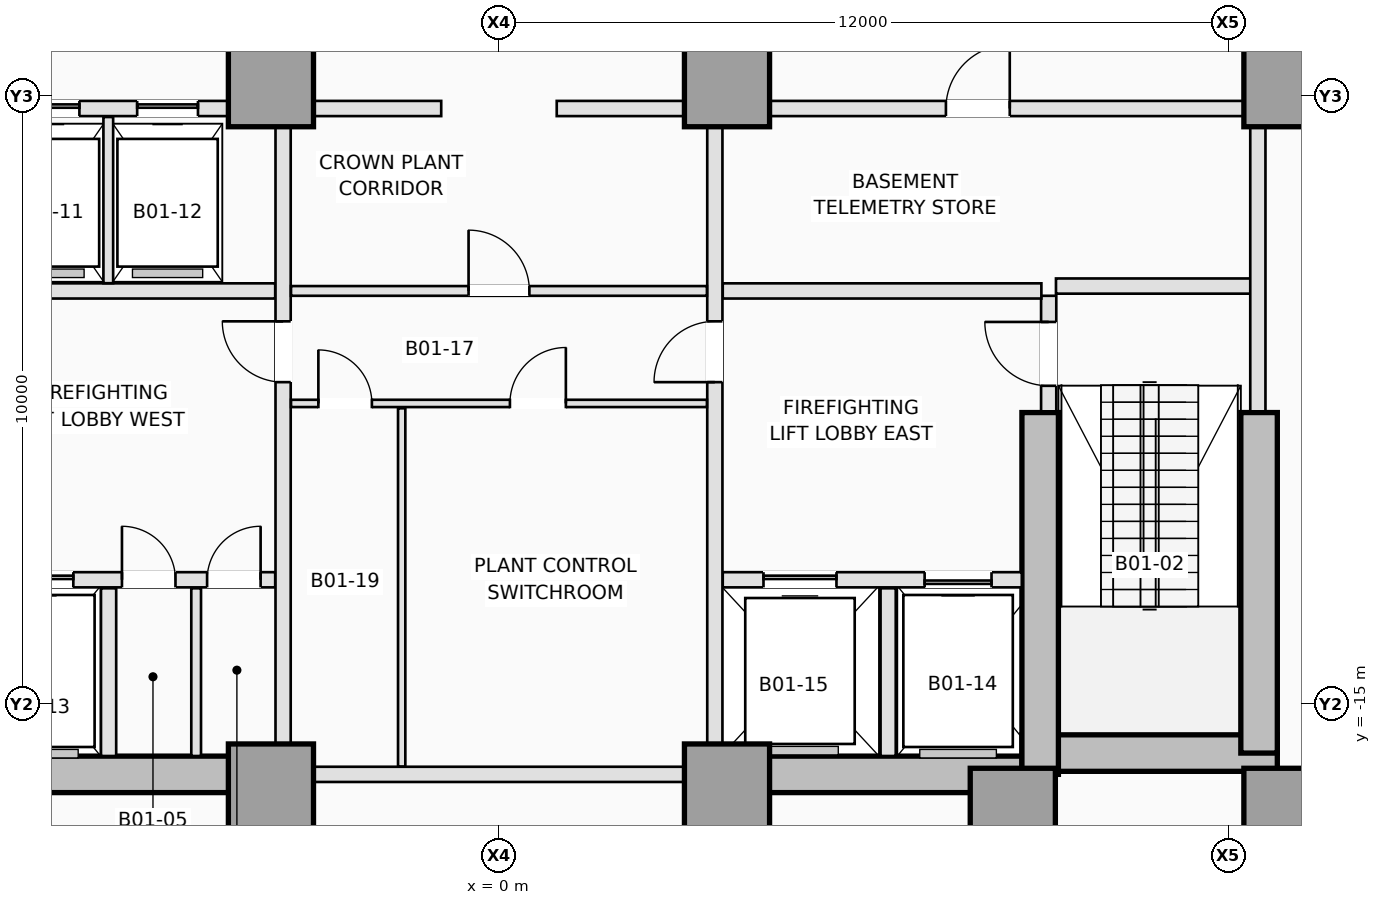
"""IFC4 building model, lengths in metres.
Left out: names, types, materials, properties, quantities, classifications, styles, units other than length and angle.
Written with IfcOpenShell. Run it as: python <this file> out.ifc"""

import sys

from ifc_helpers import new_model, si_unit, direction, frame, frame_2d, origin, origin_2d, place, context, subcontext, project, spatial, rectangle, extrude, element, fill, save


model = new_model("IFC4")
c1 = context("Model", 3, precision=1e-05, world=origin(), true_north=direction((0.0, 1.0)))
c2 = subcontext(c1, "Body", "Model", "MODEL_VIEW")
j1 = project(units=[si_unit("LENGTHUNIT", "METRE"), si_unit("PLANEANGLEUNIT", "RADIAN")], contexts=[c1])
p1 = place(None, origin())
s1 = spatial("IfcSite", under=j1, at=p1, CompositionType="ELEMENT")
p2 = place(p1, origin())
s2 = spatial("IfcBuilding", under=s1, at=p2, CompositionType="ELEMENT")
p3 = place(p2, frame((0.0, 0.0, -5.0)))
s3 = spatial("IfcBuildingStorey", under=s2, at=p3, CompositionType="ELEMENT", Elevation=-5.0)
for number, where, z_axis, x_axis in (
    (1, (-8.9, -16.15, 0.0), (0.0, 0.0, 1.0), (1.0, 0.0, 0.0)),
    (2, (3.75, -16.15, 0.0), (0.0, 0.0, 1.0), (1.0, 0.0, 0.0)),
):
    element("IfcWall", number, at=place(p3, frame(where, z_axis=z_axis, x_axis=x_axis)), inside=s3, PredefinedType="SHEAR", context=c2, shape_type="SweptSolid", body=[
        extrude(rectangle(XDim=5.15, YDim=0.6, at=frame_2d((2.575, 0.0))), origin(), (0.0, 0.0, 1.0), 5.0),
    ])
p4 = place(p3, frame((8.6, -15.8, 0.0), z_axis=(0.0, 0.0, 1.0), x_axis=(1.0, 0.0, 0.0)))
e3 = element("IfcWall", 3, at=p4, inside=s3, PredefinedType="SHEAR", context=c2, shape_type="SweptSolid", body=[
    extrude(rectangle(XDim=4.2, YDim=0.6, at=frame_2d((2.1, 0.0))), origin(), (0.0, 0.0, 1.0), 5.0),
])
p5 = place(p3, frame((12.5, -15.8, 0.0), z_axis=(0.0, 0.0, 1.0), x_axis=(0.0, 1.0, 0.0)))
e4 = element("IfcWall", 4, at=p5, inside=s3, PredefinedType="SHEAR", context=c2, shape_type="SweptSolid", body=[
    extrude(rectangle(XDim=5.6, YDim=0.6, at=frame_2d((2.8, 0.0))), origin(), (0.0, 0.0, 1.0), 5.0),
])
p6 = place(p3, frame((8.9, -16.15, 0.0), z_axis=(0.0, 0.0, 1.0), x_axis=(0.0, 1.0, 0.0)))
e5 = element("IfcWall", 5, at=p6, inside=s3, PredefinedType="SHEAR", context=c2, shape_type="SweptSolid", body=[
    extrude(rectangle(XDim=5.95, YDim=0.6, at=frame_2d((2.975, 0.0))), origin(), (0.0, 0.0, 1.0), 5.0),
])
for number, where, z_axis, x_axis in (
    (6, (-3.75, -16.35, 0.0), (0.0, 0.0, 1.0), (1.0, 0.0, 0.0)),
    (7, (3.75, -16.35, 0.0), (0.0, 0.0, 1.0), (1.0, 0.0, 0.0)),
    (8, (8.45, -16.75, 0.0), (0.0, 0.0, 1.0), (1.0, 0.0, 0.0)),
    (9, (12.95, -16.75, 0.0), (0.0, 0.0, 1.0), (1.0, 0.0, 0.0)),
    (10, (-3.75, -4.8, 0.0), (0.0, 0.0, 1.0), (1.0, 0.0, 0.0)),
    (11, (3.75, -4.8, 0.0), (0.0, 0.0, 1.0), (1.0, 0.0, 0.0)),
    (12, (12.95, -4.8, 0.0), (0.0, 0.0, 1.0), (1.0, 0.0, 0.0)),
):
    element("IfcColumn", number, at=place(p3, frame(where, z_axis=z_axis, x_axis=x_axis)), inside=s3, PredefinedType="COLUMN", context=c2, shape_type="SweptSolid", body=[
        extrude(rectangle(XDim=1.4, YDim=1.4, at=origin_2d()), origin(), (0.0, 0.0, 1.0), 5.0),
    ])
p7 = place(p3, frame((9.04, -10.18, 0.0), z_axis=(0.0, 0.0, 1.0), x_axis=(0.0, 1.0, 0.0)))
e13 = element("IfcWall", 13, at=p7, inside=s3, PredefinedType="PARTITIONING", context=c2, shape_type="SweptSolid", body=[
    extrude(rectangle(XDim=1.9, YDim=0.25, at=frame_2d((0.95, 0.0))), origin(), (0.0, 0.0, 1.0), 4.7),
])
p8 = place(p7, frame((0.42, 0.0, 0.0)))
e14 = element("IfcOpeningElement", 14, at=p8, cuts=e13, PredefinedType="OPENING", context=c2, shape_type="SweptSolid", body=[
    extrude(rectangle(XDim=1.05, YDim=2.15, at=frame_2d((0.525, 1.075))), frame((0.0, 0.135, 0.0), z_axis=(0.0, -1.0, 0.0), x_axis=(1.0, 0.0, 0.0)), (0.0, 0.0, 1.0), 0.27),
])
p9 = place(p3, frame((9.16, -8.12, 0.0), z_axis=(0.0, 0.0, 1.0), x_axis=(1.0, 0.0, 0.0)))
e15 = element("IfcWall", 15, at=p9, inside=s3, PredefinedType="PARTITIONING", context=c2, shape_type="SweptSolid", body=[
    extrude(rectangle(XDim=3.22, YDim=0.25, at=frame_2d((1.61, 0.0))), origin(), (0.0, 0.0, 1.0), 4.7),
])
p10 = place(p3, frame((12.48, -10.18, 0.0), z_axis=(0.0, 0.0, 1.0), x_axis=(0.0, 1.0, 0.0)))
e16 = element("IfcWall", 16, at=p10, inside=s3, PredefinedType="PARTITIONING", context=c2, shape_type="SweptSolid", body=[
    extrude(rectangle(XDim=4.678, YDim=0.25, at=frame_2d((2.339, 0.0))), origin(), (0.0, 0.0, 1.0), 4.7),
])
p11 = place(p3, frame((-8.598, -12.95, 0.0), z_axis=(0.0, 0.0, 1.0), x_axis=(1.0, 0.0, 0.0)))
e17 = element("IfcWall", 17, at=p11, inside=s3, PredefinedType="PARTITIONING", context=c2, shape_type="SweptSolid", body=[
    extrude(rectangle(XDim=4.918, YDim=0.25, at=frame_2d((2.459, 0.0))), origin(), (0.0, 0.0, 1.0), 4.7),
])
p12 = place(p11, frame((0.498, 0.0, 0.0)))
e18 = element("IfcOpeningElement", 18, at=p12, cuts=e17, PredefinedType="OPENING", context=c2, shape_type="SweptSolid", body=[
    extrude(rectangle(XDim=1.1, YDim=2.15, at=frame_2d((0.55, 1.075))), frame((0.0, 0.135, 0.0), z_axis=(0.0, -1.0, 0.0), x_axis=(1.0, 0.0, 0.0)), (0.0, 0.0, 1.0), 0.27),
])
p13 = place(p11, frame((2.398, 0.0, 0.0)))
e19 = element("IfcOpeningElement", 19, at=p13, cuts=e17, PredefinedType="OPENING", context=c2, shape_type="SweptSolid", body=[
    extrude(rectangle(XDim=0.88, YDim=2.1, at=frame_2d((0.44, 1.05))), frame((0.0, 0.135, 0.0), z_axis=(0.0, -1.0, 0.0), x_axis=(1.0, 0.0, 0.0)), (0.0, 0.0, 1.0), 0.27),
])
p14 = place(p11, frame((3.798, 0.0, 0.0)))
e20 = element("IfcOpeningElement", 20, at=p14, cuts=e17, PredefinedType="OPENING", context=c2, shape_type="SweptSolid", body=[
    extrude(rectangle(XDim=0.88, YDim=2.1, at=frame_2d((0.44, 1.05))), frame((0.0, 0.135, 0.0), z_axis=(0.0, -1.0, 0.0), x_axis=(1.0, 0.0, 0.0)), (0.0, 0.0, 1.0), 0.27),
])
p15 = place(p3, frame((3.68, -12.95, 0.0), z_axis=(0.0, 0.0, 1.0), x_axis=(1.0, 0.0, 0.0)))
e21 = element("IfcWall", 21, at=p15, inside=s3, PredefinedType="PARTITIONING", context=c2, shape_type="SweptSolid", body=[
    extrude(rectangle(XDim=4.918, YDim=0.25, at=frame_2d((2.459, 0.0))), origin(), (0.0, 0.0, 1.0), 4.7),
])
p16 = place(p15, frame((3.32, 0.0, 0.0)))
e22 = element("IfcOpeningElement", 22, at=p16, cuts=e21, PredefinedType="OPENING", context=c2, shape_type="SweptSolid", body=[
    extrude(rectangle(XDim=1.1, YDim=2.15, at=frame_2d((0.55, 1.075))), frame((0.0, 0.135, 0.0), z_axis=(0.0, -1.0, 0.0), x_axis=(1.0, 0.0, 0.0)), (0.0, 0.0, 1.0), 0.27),
])
p17 = place(p15, frame((0.67, 0.0, 0.0)))
e23 = element("IfcOpeningElement", 23, at=p17, cuts=e21, PredefinedType="OPENING", context=c2, shape_type="SweptSolid", body=[
    extrude(rectangle(XDim=1.2, YDim=2.15, at=frame_2d((0.6, 1.075))), frame((0.0, 0.135, 0.0), z_axis=(0.0, -1.0, 0.0), x_axis=(1.0, 0.0, 0.0)), (0.0, 0.0, 1.0), 0.27),
])
p18 = place(p3, frame((-6.42, -15.848, 0.0), z_axis=(0.0, 0.0, 1.0), x_axis=(0.0, 1.0, 0.0)))
e24 = element("IfcWall", 24, at=p18, inside=s3, PredefinedType="PARTITIONING", context=c2, shape_type="SweptSolid", body=[
    extrude(rectangle(XDim=2.758, YDim=0.25, at=frame_2d((1.379, 0.0))), origin(), (0.0, 0.0, 1.0), 4.7),
])
p19 = place(p3, frame((-4.98, -15.848, 0.0), z_axis=(0.0, 0.0, 1.0), x_axis=(0.0, 1.0, 0.0)))
e25 = element("IfcWall", 25, at=p19, inside=s3, PredefinedType="PARTITIONING", context=c2, shape_type="SweptSolid", body=[
    extrude(rectangle(XDim=2.758, YDim=0.16, at=frame_2d((1.379, 0.0))), origin(), (0.0, 0.0, 1.0), 4.7),
])
p20 = place(p3, frame((6.4, -15.848, 0.0), z_axis=(0.0, 0.0, 1.0), x_axis=(0.0, 1.0, 0.0)))
e26 = element("IfcWall", 26, at=p20, inside=s3, PredefinedType="PARTITIONING", context=c2, shape_type="SweptSolid", body=[
    extrude(rectangle(XDim=2.758, YDim=0.25, at=frame_2d((1.379, 0.0))), origin(), (0.0, 0.0, 1.0), 4.7),
])
for number, where, z_axis, x_axis in (
    (27, (-8.92, -8.2, 0.0), (0.0, 0.0, 1.0), (1.0, 0.0, 0.0)),
    (28, (3.68, -8.2, 0.0), (0.0, 0.0, 1.0), (1.0, 0.0, 0.0)),
):
    element("IfcWall", number, at=place(p3, frame(where, z_axis=z_axis, x_axis=x_axis)), inside=s3, PredefinedType="PARTITIONING", context=c2, shape_type="SweptSolid", body=[
        extrude(rectangle(XDim=5.24, YDim=0.25, at=frame_2d((2.62, 0.0))), origin(), (0.0, 0.0, 1.0), 4.7),
    ])
p21 = place(p3, frame((-3.55, -15.648, 0.0), z_axis=(0.0, 0.0, 1.0), x_axis=(0.0, 1.0, 0.0)))
e29 = element("IfcWall", 29, at=p21, inside=s3, PredefinedType="PARTITIONING", context=c2, shape_type="SweptSolid", body=[
    extrude(rectangle(XDim=10.146, YDim=0.25, at=frame_2d((5.073, 0.0))), origin(), (0.0, 0.0, 1.0), 4.7),
])
p22 = place(p21, frame((5.948, 0.0, 0.0)))
e30 = element("IfcOpeningElement", 30, at=p22, cuts=e29, PredefinedType="OPENING", context=c2, shape_type="SweptSolid", body=[
    extrude(rectangle(XDim=1.0, YDim=2.15, at=frame_2d((0.5, 1.075))), frame((0.0, 0.135, 0.0), z_axis=(0.0, -1.0, 0.0), x_axis=(1.0, 0.0, 0.0)), (0.0, 0.0, 1.0), 0.27),
])
p23 = place(p3, frame((3.55, -15.648, 0.0), z_axis=(0.0, 0.0, 1.0), x_axis=(0.0, 1.0, 0.0)))
e31 = element("IfcWall", 31, at=p23, inside=s3, PredefinedType="PARTITIONING", context=c2, shape_type="SweptSolid", body=[
    extrude(rectangle(XDim=10.146, YDim=0.25, at=frame_2d((5.073, 0.0))), origin(), (0.0, 0.0, 1.0), 4.7),
])
p24 = place(p23, frame((5.948, 0.0, 0.0)))
e32 = element("IfcOpeningElement", 32, at=p24, cuts=e31, PredefinedType="OPENING", context=c2, shape_type="SweptSolid", body=[
    extrude(rectangle(XDim=1.0, YDim=2.15, at=frame_2d((0.5, 1.075))), frame((0.0, 0.135, 0.0), z_axis=(0.0, -1.0, 0.0), x_axis=(1.0, 0.0, 0.0)), (0.0, 0.0, 1.0), 0.27),
])
p25 = place(p3, frame((-12.248, -5.2, 0.0), z_axis=(0.0, 0.0, 1.0), x_axis=(1.0, 0.0, 0.0)))
e33 = element("IfcWall", 33, at=p25, inside=s3, PredefinedType="PARTITIONING", context=c2, shape_type="SweptSolid", body=[
    extrude(rectangle(XDim=7.796, YDim=0.25, at=frame_2d((3.898, 0.0))), origin(), (0.0, 0.0, 1.0), 4.7),
])
p26 = place(p25, frame((0.448, 0.0, 0.0)))
e34 = element("IfcOpeningElement", 34, at=p26, cuts=e33, PredefinedType="OPENING", context=c2, shape_type="SweptSolid", body=[
    extrude(rectangle(XDim=1.0, YDim=2.15, at=frame_2d((0.5, 1.075))), frame((0.0, 0.135, 0.0), z_axis=(0.0, -1.0, 0.0), x_axis=(1.0, 0.0, 0.0)), (0.0, 0.0, 1.0), 0.27),
])
p27 = place(p25, frame((2.398, 0.0, 0.0)))
e35 = element("IfcOpeningElement", 35, at=p27, cuts=e33, PredefinedType="OPENING", context=c2, shape_type="SweptSolid", body=[
    extrude(rectangle(XDim=1.0, YDim=2.15, at=frame_2d((0.5, 1.075))), frame((0.0, 0.135, 0.0), z_axis=(0.0, -1.0, 0.0), x_axis=(1.0, 0.0, 0.0)), (0.0, 0.0, 1.0), 0.27),
])
p28 = place(p25, frame((4.348, 0.0, 0.0)))
e36 = element("IfcOpeningElement", 36, at=p28, cuts=e33, PredefinedType="OPENING", context=c2, shape_type="SweptSolid", body=[
    extrude(rectangle(XDim=1.0, YDim=2.15, at=frame_2d((0.5, 1.075))), frame((0.0, 0.135, 0.0), z_axis=(0.0, -1.0, 0.0), x_axis=(1.0, 0.0, 0.0)), (0.0, 0.0, 1.0), 0.27),
])
p29 = place(p25, frame((6.298, 0.0, 0.0)))
e37 = element("IfcOpeningElement", 37, at=p29, cuts=e33, PredefinedType="OPENING", context=c2, shape_type="SweptSolid", body=[
    extrude(rectangle(XDim=1.0, YDim=2.15, at=frame_2d((0.5, 1.075))), frame((0.0, 0.135, 0.0), z_axis=(0.0, -1.0, 0.0), x_axis=(1.0, 0.0, 0.0)), (0.0, 0.0, 1.0), 0.27),
])
p30 = place(p3, frame((4.452, -5.2, 0.0), z_axis=(0.0, 0.0, 1.0), x_axis=(1.0, 0.0, 0.0)))
e38 = element("IfcWall", 38, at=p30, inside=s3, PredefinedType="PARTITIONING", context=c2, shape_type="SweptSolid", body=[
    extrude(rectangle(XDim=7.796, YDim=0.25, at=frame_2d((3.898, 0.0))), origin(), (0.0, 0.0, 1.0), 4.7),
])
p31 = place(p30, frame((2.898, 0.0, 0.0)))
e39 = element("IfcOpeningElement", 39, at=p31, cuts=e38, PredefinedType="OPENING", context=c2, shape_type="SweptSolid", body=[
    extrude(rectangle(XDim=1.05, YDim=2.12, at=frame_2d((0.525, 1.06))), frame((0.0, 0.135, 0.0), z_axis=(0.0, -1.0, 0.0), x_axis=(1.0, 0.0, 0.0)), (0.0, 0.0, 1.0), 0.27),
])
for number, where, z_axis, x_axis in (
    (40, (-3.048, -5.2, 0.0), (0.0, 0.0, 1.0), (1.0, 0.0, 0.0)),
    (41, (0.95, -5.2, 0.0), (0.0, 0.0, 1.0), (1.0, 0.0, 0.0)),
):
    element("IfcWall", number, at=place(p3, frame(where, z_axis=z_axis, x_axis=x_axis)), inside=s3, PredefinedType="PARTITIONING", context=c2, shape_type="SweptSolid", body=[
        extrude(rectangle(XDim=2.098, YDim=0.25, at=frame_2d((1.049, 0.0))), origin(), (0.0, 0.0, 1.0), 4.7),
    ])
p32 = place(p3, frame((-6.425, -8.073, 0.0), z_axis=(0.0, 0.0, 1.0), x_axis=(0.0, 1.0, 0.0)))
e42 = element("IfcWall", 42, at=p32, inside=s3, PredefinedType="PARTITIONING", context=c2, shape_type="SweptSolid", body=[
    extrude(rectangle(XDim=2.733, YDim=0.16, at=frame_2d((1.366, 0.0))), origin(), (0.0, 0.0, 1.0), 4.7),
])
p33 = place(p3, frame((-3.048, -16.15, 0.0), z_axis=(0.0, 0.0, 1.0), x_axis=(1.0, 0.0, 0.0)))
e43 = element("IfcWall", 43, at=p33, inside=s3, PredefinedType="PARTITIONING", context=c2, shape_type="SweptSolid", body=[
    extrude(rectangle(XDim=6.096, YDim=0.25, at=frame_2d((3.048, 0.0))), origin(), (0.0, 0.0, 1.0), 3.676),
])
p34 = place(p3, frame((-3.42, -8.2, 0.0), z_axis=(0.0, 0.0, 1.0), x_axis=(1.0, 0.0, 0.0)))
e44 = element("IfcWall", 44, at=p34, inside=s3, PredefinedType="PARTITIONING", context=c2, shape_type="SweptSolid", body=[
    extrude(rectangle(XDim=6.84, YDim=0.16, at=frame_2d((3.42, 0.0))), origin(), (0.0, 0.0, 1.0), 4.7),
])
p35 = place(p34, frame((2.92, 0.0, 0.0)))
e45 = element("IfcOpeningElement", 45, at=p35, cuts=e44, PredefinedType="OPENING", context=c2, shape_type="SweptSolid", body=[
    extrude(rectangle(XDim=1.0, YDim=2.15, at=frame_2d((0.5, 1.075))), frame((0.0, 0.09, 0.0), z_axis=(0.0, -1.0, 0.0), x_axis=(1.0, 0.0, 0.0)), (0.0, 0.0, 1.0), 0.18),
])
p36 = place(p3, frame((-3.42, -10.05, 0.0), z_axis=(0.0, 0.0, 1.0), x_axis=(1.0, 0.0, 0.0)))
e46 = element("IfcWall", 46, at=p36, inside=s3, PredefinedType="PARTITIONING", context=c2, shape_type="SweptSolid", body=[
    extrude(rectangle(XDim=6.84, YDim=0.12, at=frame_2d((3.42, 0.0))), origin(), (0.0, 0.0, 1.0), 4.7),
])
p37 = place(p36, frame((0.45, 0.0, 0.0)))
e47 = element("IfcOpeningElement", 47, at=p37, cuts=e46, PredefinedType="OPENING", context=c2, shape_type="SweptSolid", body=[
    extrude(rectangle(XDim=0.88, YDim=2.12, at=frame_2d((0.44, 1.06))), frame((0.0, 0.07, 0.0), z_axis=(0.0, -1.0, 0.0), x_axis=(1.0, 0.0, 0.0)), (0.0, 0.0, 1.0), 0.14),
])
p38 = place(p36, frame((3.6, 0.0, 0.0)))
e48 = element("IfcOpeningElement", 48, at=p38, cuts=e46, PredefinedType="OPENING", context=c2, shape_type="SweptSolid", body=[
    extrude(rectangle(XDim=0.92, YDim=2.12, at=frame_2d((0.46, 1.06))), frame((0.0, 0.07, 0.0), z_axis=(0.0, -1.0, 0.0), x_axis=(1.0, 0.0, 0.0)), (0.0, 0.0, 1.0), 0.14),
])
p39 = place(p3, frame((-1.6, -16.02, 0.0), z_axis=(0.0, 0.0, 1.0), x_axis=(0.0, 1.0, 0.0)))
e49 = element("IfcWall", 49, at=p39, inside=s3, PredefinedType="PARTITIONING", context=c2, shape_type="SweptSolid", body=[
    extrude(rectangle(XDim=5.89, YDim=0.12, at=frame_2d((2.945, 0.0))), origin(), (0.0, 0.0, 1.0), 4.7),
])
p40 = place(p28, origin())
e50 = element("IfcDoor", 50, at=p40, inside=s3, OperationType="SLIDING_TO_LEFT", PredefinedType="DOOR", context=c2, shape_type="SweptSolid", body=[
    extrude(rectangle(XDim=1.0, YDim=2.15, at=frame_2d((0.5, 1.075))), frame((0.0, 0.025, 0.0), z_axis=(0.0, -1.0, 0.0), x_axis=(1.0, 0.0, 0.0)), (0.0, 0.0, 1.0), 0.05),
])
fill(e36, e50)
p41 = place(p29, origin())
e51 = element("IfcDoor", 51, at=p41, inside=s3, OperationType="SLIDING_TO_LEFT", PredefinedType="DOOR", context=c2, shape_type="SweptSolid", body=[
    extrude(rectangle(XDim=1.0, YDim=2.15, at=frame_2d((0.5, 1.075))), frame((0.0, 0.025, 0.0), z_axis=(0.0, -1.0, 0.0), x_axis=(1.0, 0.0, 0.0)), (0.0, 0.0, 1.0), 0.05),
])
fill(e37, e51)
p42 = place(p12, origin())
e52 = element("IfcDoor", 52, at=p42, inside=s3, OperationType="SLIDING_TO_LEFT", PredefinedType="DOOR", context=c2, shape_type="SweptSolid", body=[
    extrude(rectangle(XDim=1.1, YDim=2.15, at=frame_2d((0.55, 1.075))), frame((0.0, 0.025, 0.0), z_axis=(0.0, -1.0, 0.0), x_axis=(1.0, 0.0, 0.0)), (0.0, 0.0, 1.0), 0.05),
])
fill(e18, e52)
p43 = place(p16, origin())
e53 = element("IfcDoor", 53, at=p43, inside=s3, OperationType="SLIDING_TO_RIGHT", PredefinedType="DOOR", context=c2, shape_type="SweptSolid", body=[
    extrude(rectangle(XDim=1.1, YDim=2.15, at=frame_2d((0.55, 1.075))), frame((0.0, 0.025, 0.0), z_axis=(0.0, -1.0, 0.0), x_axis=(1.0, 0.0, 0.0)), (0.0, 0.0, 1.0), 0.05),
])
fill(e22, e53)
p44 = place(p17, origin())
e54 = element("IfcDoor", 54, at=p44, inside=s3, OperationType="SLIDING_TO_LEFT", PredefinedType="DOOR", context=c2, shape_type="SweptSolid", body=[
    extrude(rectangle(XDim=1.2, YDim=2.15, at=frame_2d((0.6, 1.075))), frame((0.0, 0.025, 0.0), z_axis=(0.0, -1.0, 0.0), x_axis=(1.0, 0.0, 0.0)), (0.0, 0.0, 1.0), 0.05),
])
fill(e23, e54)
p45 = place(p8, origin())
e55 = element("IfcDoor", 55, at=p45, inside=s3, OperationType="SINGLE_SWING_RIGHT", PredefinedType="DOOR", context=c2, shape_type="SweptSolid", body=[
    extrude(rectangle(XDim=1.05, YDim=2.15, at=frame_2d((0.525, 1.075))), frame((0.0, 0.025, 0.0), z_axis=(0.0, -1.0, 0.0), x_axis=(1.0, 0.0, 0.0)), (0.0, 0.0, 1.0), 0.05),
])
fill(e14, e55)
p46 = place(p13, origin())
e56 = element("IfcDoor", 56, at=p46, inside=s3, OperationType="SINGLE_SWING_LEFT", PredefinedType="TRAPDOOR", context=c2, shape_type="SweptSolid", body=[
    extrude(rectangle(XDim=0.88, YDim=2.1, at=frame_2d((0.44, 1.05))), frame((0.0, 0.025, 0.0), z_axis=(0.0, -1.0, 0.0), x_axis=(1.0, 0.0, 0.0)), (0.0, 0.0, 1.0), 0.05),
])
fill(e19, e56)
p47 = place(p14, origin())
e57 = element("IfcDoor", 57, at=p47, inside=s3, OperationType="SINGLE_SWING_RIGHT", PredefinedType="TRAPDOOR", context=c2, shape_type="SweptSolid", body=[
    extrude(rectangle(XDim=0.88, YDim=2.1, at=frame_2d((0.44, 1.05))), frame((0.0, 0.025, 0.0), z_axis=(0.0, -1.0, 0.0), x_axis=(1.0, 0.0, 0.0)), (0.0, 0.0, 1.0), 0.05),
])
fill(e20, e57)
p48 = place(p22, origin())
e58 = element("IfcDoor", 58, at=p48, inside=s3, OperationType="SINGLE_SWING_RIGHT", PredefinedType="DOOR", context=c2, shape_type="SweptSolid", body=[
    extrude(rectangle(XDim=1.0, YDim=2.15, at=frame_2d((0.5, 1.075))), frame((0.0, 0.025, 0.0), z_axis=(0.0, -1.0, 0.0), x_axis=(1.0, 0.0, 0.0)), (0.0, 0.0, 1.0), 0.05),
])
fill(e30, e58)
p49 = place(p24, origin())
e59 = element("IfcDoor", 59, at=p49, inside=s3, OperationType="SINGLE_SWING_LEFT", PredefinedType="DOOR", context=c2, shape_type="SweptSolid", body=[
    extrude(rectangle(XDim=1.0, YDim=2.15, at=frame_2d((0.5, 1.075))), frame((0.0, 0.025, 0.0), z_axis=(0.0, -1.0, 0.0), x_axis=(1.0, 0.0, 0.0)), (0.0, 0.0, 1.0), 0.05),
])
fill(e32, e59)
p50 = place(p31, origin())
e60 = element("IfcDoor", 60, at=p50, inside=s3, OperationType="SINGLE_SWING_RIGHT", PredefinedType="DOOR", context=c2, shape_type="SweptSolid", body=[
    extrude(rectangle(XDim=1.05, YDim=2.12, at=frame_2d((0.525, 1.06))), frame((0.0, 0.025, 0.0), z_axis=(0.0, -1.0, 0.0), x_axis=(1.0, 0.0, 0.0)), (0.0, 0.0, 1.0), 0.05),
])
fill(e39, e60)
p51 = place(p35, origin())
e61 = element("IfcDoor", 61, at=p51, inside=s3, OperationType="SINGLE_SWING_LEFT", PredefinedType="DOOR", context=c2, shape_type="SweptSolid", body=[
    extrude(rectangle(XDim=1.0, YDim=2.15, at=frame_2d((0.5, 1.075))), frame((0.0, 0.025, 0.0), z_axis=(0.0, -1.0, 0.0), x_axis=(1.0, 0.0, 0.0)), (0.0, 0.0, 1.0), 0.05),
])
fill(e45, e61)
p52 = place(p37, origin())
e62 = element("IfcDoor", 62, at=p52, inside=s3, OperationType="SINGLE_SWING_LEFT", PredefinedType="DOOR", context=c2, shape_type="SweptSolid", body=[
    extrude(rectangle(XDim=0.88, YDim=2.12, at=frame_2d((0.44, 1.06))), frame((0.0, 0.025, 0.0), z_axis=(0.0, -1.0, 0.0), x_axis=(1.0, 0.0, 0.0)), (0.0, 0.0, 1.0), 0.05),
])
fill(e47, e62)
p53 = place(p38, origin())
e63 = element("IfcDoor", 63, at=p53, inside=s3, OperationType="SINGLE_SWING_RIGHT", PredefinedType="DOOR", context=c2, shape_type="SweptSolid", body=[
    extrude(rectangle(XDim=0.92, YDim=2.12, at=frame_2d((0.46, 1.06))), frame((0.0, 0.025, 0.0), z_axis=(0.0, -1.0, 0.0), x_axis=(1.0, 0.0, 0.0)), (0.0, 0.0, 1.0), 0.05),
])
fill(e48, e63)
save(model, sys.argv[1])
